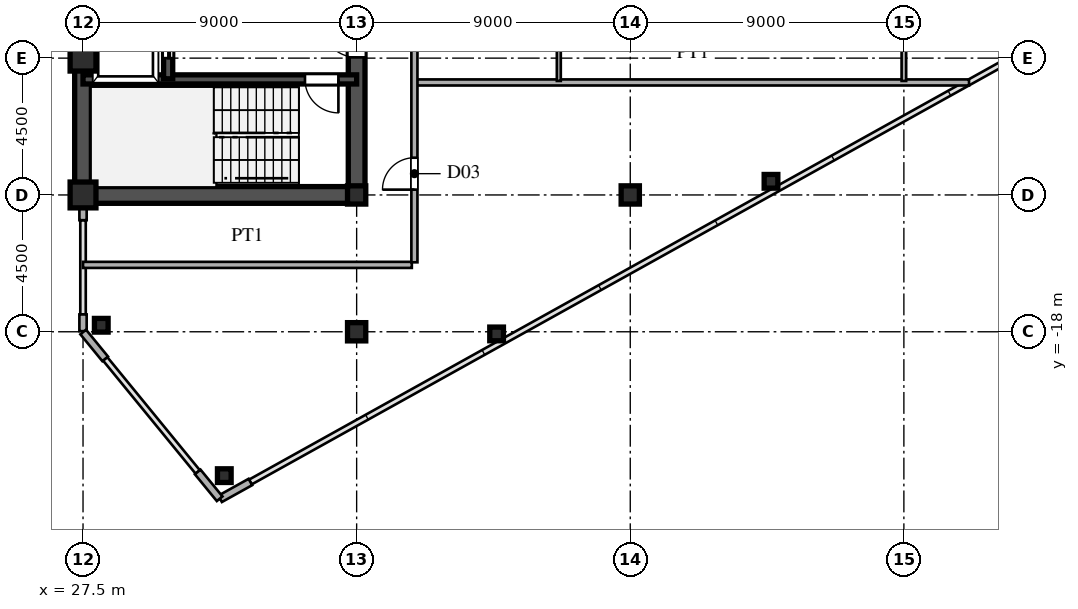
"""IFC4 building model, lengths in metres.
Left out: names, types, materials, properties, quantities, classifications, styles, units other than length and angle.
Written with IfcOpenShell. Run it as: python <this file> out.ifc"""

import sys

from ifc_helpers import new_model, si_unit, direction, frame, frame_2d, origin, origin_2d, place, context, subcontext, project, spatial, rectangle, hollow_rectangle, i_section, extrude, source, transform, mapped, element, fill, save


model = new_model("IFC4")
c1 = context("Model", 3, precision=1e-05, world=origin(), true_north=direction((0.0, 1.0)))
c2 = subcontext(c1, "Body", "Model", "MODEL_VIEW")
j1 = project(units=[si_unit("LENGTHUNIT", "METRE"), si_unit("PLANEANGLEUNIT", "RADIAN")], contexts=[c1])
p1 = place(None, origin())
s1 = spatial("IfcSite", under=j1, at=p1, CompositionType="ELEMENT")
p2 = place(p1, origin())
s2 = spatial("IfcBuilding", under=s1, at=p2, CompositionType="ELEMENT")
p3 = place(p2, frame((0.0, 0.0, 185.1)))
s3 = spatial("IfcBuildingStorey", under=s2, at=p3, CompositionType="ELEMENT", Elevation=185.1)
m1 = source(origin(), c2, "Body", "SweptSolid", [
    extrude(hollow_rectangle(XDim=0.85, YDim=0.85, WallThickness=0.036, at=origin_2d()), origin(), (0.0, 0.0, 1.0), 3.6),
])
for number, where, z_axis, x_axis in (
    (1, (27.5, -13.5, 0.0), (0.0, 0.0, 1.0), (1.0, 0.0, 0.0)),
    (2, (27.5, -9.0, 0.0), (0.0, 0.0, 1.0), (1.0, 0.0, 0.0)),
):
    element("IfcColumn", number, at=place(p3, frame(where, z_axis=z_axis, x_axis=x_axis)), inside=s3, PredefinedType="COLUMN", context=c2, shape_type="MappedRepresentation", body=[
        mapped(m1, transform((0.0, 0.0, 0.0), scale=1.0)),
    ])
m2 = source(origin(), c2, "Body", "SweptSolid", [
    extrude(i_section(OverallWidth=0.6, OverallDepth=0.6, WebThickness=0.025, FlangeThickness=0.04, at=origin_2d()), origin(), (0.0, 0.0, 1.0), 3.6),
])
for number, where, z_axis, x_axis in (
    (3, (36.5, -18.0, 0.0), (0.0, 0.0, 1.0), (1.0, 0.0, 0.0)),
    (4, (36.5, -13.5, 0.0), (0.0, 0.0, 1.0), (1.0, 0.0, 0.0)),
    (5, (45.5, -13.5, 0.0), (0.0, 0.0, 1.0), (1.0, 0.0, 0.0)),
):
    element("IfcColumn", number, at=place(p3, frame(where, z_axis=z_axis, x_axis=x_axis)), inside=s3, PredefinedType="COLUMN", context=c2, shape_type="MappedRepresentation", body=[
        mapped(m2, transform((0.0, 0.0, 0.0), scale=1.0)),
    ])
m3 = source(origin(), c2, "Body", "SweptSolid", [
    extrude(hollow_rectangle(XDim=0.45, YDim=0.45, WallThickness=0.018, at=origin_2d()), origin(), (0.0, 0.0, 1.0), 3.6),
])
for number, where, z_axis, x_axis in (
    (6, (32.147, -22.732, 0.0), (0.0, 0.0, 1.0), (1.0, 0.0, 0.0)),
    (7, (28.1, -17.786, 0.0), (0.0, 0.0, 1.0), (1.0, 0.0, 0.0)),
    (8, (41.104, -18.071, 0.0), (0.0, 0.0, 1.0), (1.0, 0.0, 0.0)),
    (9, (50.129, -13.051, 0.0), (0.0, 0.0, 1.0), (1.0, 0.0, 0.0)),
):
    element("IfcColumn", number, at=place(p3, frame(where, z_axis=z_axis, x_axis=x_axis)), inside=s3, PredefinedType="COLUMN", context=c2, shape_type="MappedRepresentation", body=[
        mapped(m3, transform((0.0, 0.0, 0.0), scale=1.0)),
    ])
p4 = place(p3, frame((32.009, -23.495, 0.0), z_axis=(0.0, 0.0, 1.0), x_axis=(0.87385402111, 0.486188389196, 0.0)))
e10 = element("IfcWall", 10, at=p4, inside=s3, PredefinedType="SOLIDWALL", context=c2, shape_type="SweptSolid", body=[
    extrude(rectangle(XDim=1.14, YDim=0.24, at=frame_2d((0.57, 0.0))), origin(), (0.0, 0.0, 1.0), 3.38),
])
p5 = place(p3, frame((27.5, -17.98, 0.0), z_axis=(0.0, 0.0, 1.0), x_axis=(0.0, 1.0, 0.0)))
e11 = element("IfcWall", 11, at=p5, inside=s3, PredefinedType="SOLIDWALL", context=c2, shape_type="SweptSolid", body=[
    extrude(rectangle(XDim=0.55, YDim=0.24, at=frame_2d((0.275, 0.0))), origin(), (0.0, 0.0, 1.0), 3.38),
])
p6 = place(p3, frame((27.5, -14.33, 0.0), z_axis=(0.0, 0.0, 1.0), x_axis=(0.0, 1.0, 0.0)))
e12 = element("IfcWall", 12, at=p6, inside=s3, PredefinedType="SOLIDWALL", context=c2, shape_type="SweptSolid", body=[
    extrude(rectangle(XDim=0.55, YDim=0.24, at=frame_2d((0.275, 0.0))), origin(), (0.0, 0.0, 1.0), 2.88),
])
for number, where, z_axis, x_axis in (
    (13, (27.506, -18.008, 0.0), (0.0, 0.0, 1.0), (0.633, -0.774, 0.0)),
    (14, (31.272, -22.61, 0.0), (0.0, 0.0, 1.0), (0.633, -0.774, 0.0)),
):
    element("IfcWall", number, at=place(p3, frame(where, z_axis=z_axis, x_axis=x_axis)), inside=s3, PredefinedType="SOLIDWALL", context=c2, shape_type="SweptSolid", body=[
        extrude(rectangle(XDim=1.14, YDim=0.24, at=frame_2d((0.57, 0.0))), origin(), (0.0, 0.0, 1.0), 3.38),
    ])
p7 = place(p3, frame((27.5, -13.5, 0.0), z_axis=(0.0, 0.0, 1.0), x_axis=(0.0, 1.0, 0.0)))
e15 = element("IfcWall", 15, at=p7, inside=s3, PredefinedType="SHEAR", context=c2, shape_type="SweptSolid", body=[
    extrude(rectangle(XDim=12.2, YDim=0.55, at=frame_2d((6.1, 0.0))), origin(), (0.0, 0.0, 1.0), 3.38),
])
p8 = place(p3, frame((27.5, -13.5, 0.0), z_axis=(0.0, 0.0, 1.0), x_axis=(1.0, 0.0, 0.0)))
e16 = element("IfcWall", 16, at=p8, inside=s3, PredefinedType="SHEAR", context=c2, shape_type="SweptSolid", body=[
    extrude(rectangle(XDim=9.0, YDim=0.55, at=frame_2d((4.5, 0.0))), origin(), (0.0, 0.0, 1.0), 3.38),
])
p9 = place(p3, frame((36.5, -13.65, 0.0), z_axis=(0.0, 0.0, 1.0), x_axis=(0.0, 1.0, 0.0)))
e17 = element("IfcWall", 17, at=p9, inside=s3, PredefinedType="SHEAR", context=c2, shape_type="SweptSolid", body=[
    extrude(rectangle(XDim=7.15, YDim=0.55, at=frame_2d((3.575, 0.0))), origin(), (0.0, 0.0, 1.0), 3.38),
])
p10 = place(p9, frame((4.675, 0.0, 0.0)))
e18 = element("IfcOpeningElement", 18, at=p10, cuts=e17, PredefinedType="OPENING", context=c2, shape_type="SweptSolid", body=[
    extrude(rectangle(XDim=1.15, YDim=2.2, at=frame_2d((0.575, 1.1))), frame((0.0, 0.285, 0.0), z_axis=(0.0, -1.0, 0.0), x_axis=(1.0, 0.0, 0.0)), (0.0, 0.0, 1.0), 0.57),
])
p11 = place(p3, frame((27.5, -9.7, 0.0), z_axis=(0.0, 0.0, 1.0), x_axis=(1.0, 0.0, 0.0)))
e19 = element("IfcWall", 19, at=p11, inside=s3, PredefinedType="SHEAR", context=c2, shape_type="SweptSolid", body=[
    extrude(rectangle(XDim=9.0, YDim=0.3, at=frame_2d((4.5, 0.0))), origin(), (0.0, 0.0, 1.0), 3.38),
])
p12 = place(p11, frame((7.3, 0.0, 0.0)))
e20 = element("IfcOpeningElement", 20, at=p12, cuts=e19, PredefinedType="OPENING", context=c2, shape_type="SweptSolid", body=[
    extrude(rectangle(XDim=1.1, YDim=2.2, at=frame_2d((0.55, 1.1))), frame((0.0, 0.16, 0.0), z_axis=(0.0, -1.0, 0.0), x_axis=(1.0, 0.0, 0.0)), (0.0, 0.0, 1.0), 0.32),
])
p13 = place(p3, frame((30.3, -9.68, 0.0), z_axis=(0.0, 0.0, 1.0), x_axis=(0.0, 1.0, 0.0)))
e21 = element("IfcWall", 21, at=p13, inside=s3, PredefinedType="SHEAR", context=c2, shape_type="SweptSolid", body=[
    extrude(rectangle(XDim=2.56, YDim=0.3, at=frame_2d((1.28, 0.0))), origin(), (0.0, 0.0, 1.0), 3.38),
])
p14 = place(p13, frame((0.68, 0.0, 0.0)))
e22 = element("IfcOpeningElement", 22, at=p14, cuts=e21, PredefinedType="OPENING", context=c2, shape_type="SweptSolid", body=[
    extrude(rectangle(XDim=1.2, YDim=2.25, at=frame_2d((0.6, 1.125))), frame((0.0, 0.16, 0.0), z_axis=(0.0, -1.0, 0.0), x_axis=(1.0, 0.0, 0.0)), (0.0, 0.0, 1.0), 0.32),
])
p15 = place(p3, frame((27.5, -15.8, 0.0), z_axis=(0.0, 0.0, 1.0), x_axis=(1.0, 0.0, 0.0)))
e23 = element("IfcWall", 23, at=p15, inside=s3, PredefinedType="PARTITIONING", context=c2, shape_type="SweptSolid", body=[
    extrude(rectangle(XDim=10.815, YDim=0.2, at=frame_2d((5.407, 0.0))), origin(), (0.0, 0.0, 1.0), 3.38),
])
p16 = place(p3, frame((38.48, -9.8, 0.0), z_axis=(0.0, 0.0, 1.0), x_axis=(1.0, 0.0, 0.0)))
e24 = element("IfcWall", 24, at=p16, inside=s3, PredefinedType="PARTITIONING", context=c2, shape_type="SweptSolid", body=[
    extrude(rectangle(XDim=18.163, YDim=0.2, at=frame_2d((9.082, 0.0))), origin(), (0.0, 0.0, 1.0), 3.38),
])
p17 = place(p3, frame((38.4, -15.715, 0.0), z_axis=(0.0, 0.0, 1.0), x_axis=(0.0, 1.0, 0.0)))
e25 = element("IfcWall", 25, at=p17, inside=s3, PredefinedType="PARTITIONING", context=c2, shape_type="SweptSolid", body=[
    extrude(rectangle(XDim=31.43, YDim=0.2, at=frame_2d((15.715, 0.0))), origin(), (0.0, 0.0, 1.0), 3.38),
])
p18 = place(p17, frame((2.39, 0.0, 0.0)))
e26 = element("IfcOpeningElement", 26, at=p18, cuts=e25, PredefinedType="OPENING", context=c2, shape_type="SweptSolid", body=[
    extrude(rectangle(XDim=1.05, YDim=2.25, at=frame_2d((0.525, 1.125))), frame((0.0, 0.11, 0.0), z_axis=(0.0, -1.0, 0.0), x_axis=(1.0, 0.0, 0.0)), (0.0, 0.0, 1.0), 0.22),
])
p19 = place(p17, frame((11.695, 0.0, 0.0)))
e27 = element("IfcOpeningElement", 27, at=p19, cuts=e25, PredefinedType="OPENING", context=c2, shape_type="SweptSolid", body=[
    extrude(rectangle(XDim=1.05, YDim=2.25, at=frame_2d((0.525, 1.125))), frame((0.0, 0.11, 0.0), z_axis=(0.0, -1.0, 0.0), x_axis=(1.0, 0.0, 0.0)), (0.0, 0.0, 1.0), 0.22),
])
p20 = place(p17, frame((24.69, 0.0, 0.0)))
e28 = element("IfcOpeningElement", 28, at=p20, cuts=e25, PredefinedType="OPENING", context=c2, shape_type="SweptSolid", body=[
    extrude(rectangle(XDim=1.05, YDim=2.25, at=frame_2d((0.525, 1.125))), frame((0.0, 0.11, 0.0), z_axis=(0.0, -1.0, 0.0), x_axis=(1.0, 0.0, 0.0)), (0.0, 0.0, 1.0), 0.22),
])
p21 = place(p3, frame((43.15, -9.75, 0.0), z_axis=(0.0, 0.0, 1.0), x_axis=(0.0, 1.0, 0.0)))
e29 = element("IfcWall", 29, at=p21, inside=s3, PredefinedType="PARTITIONING", context=c2, shape_type="SweptSolid", body=[
    extrude(rectangle(XDim=3.408, YDim=0.13, at=frame_2d((1.704, 0.0))), origin(), (0.0, 0.0, 1.0), 3.38),
])
p22 = place(p3, frame((54.5, -9.75, 0.0), z_axis=(0.0, 0.0, 1.0), x_axis=(0.0, 1.0, 0.0)))
e30 = element("IfcWall", 30, at=p22, inside=s3, PredefinedType="PARTITIONING", context=c2, shape_type="SweptSolid", body=[
    extrude(rectangle(XDim=12.9, YDim=0.15, at=frame_2d((6.45, 0.0))), origin(), (0.0, 0.0, 1.0), 2.78),
])
p23 = place(p22, frame((5.975, 0.0, 0.0)))
e31 = element("IfcOpeningElement", 31, at=p23, cuts=e30, PredefinedType="OPENING", context=c2, shape_type="SweptSolid", body=[
    extrude(rectangle(XDim=0.95, YDim=2.15, at=frame_2d((0.475, 1.075))), frame((0.0, 0.085, 0.0), z_axis=(0.0, -1.0, 0.0), x_axis=(1.0, 0.0, 0.0)), (0.0, 0.0, 1.0), 0.17),
])
m4 = source(origin(), c2, "Body", "SweptSolid", [
    extrude(rectangle(XDim=1.15, YDim=2.2, at=frame_2d((0.575, 1.1))), frame((0.0, 0.025, 0.0), z_axis=(0.0, -1.0, 0.0), x_axis=(1.0, 0.0, 0.0)), (0.0, 0.0, 1.0), 0.05),
])
p24 = place(p10, origin())
e32 = element("IfcDoor", 32, at=p24, inside=s3, OperationType="SINGLE_SWING_RIGHT", PredefinedType="DOOR", context=c2, shape_type="MappedRepresentation", body=[
    mapped(m4, transform((0.0, 0.0, 0.0), scale=1.0)),
])
fill(e18, e32)
m5 = source(origin(), c2, "Body", "SweptSolid", [
    extrude(rectangle(XDim=1.1, YDim=2.2, at=frame_2d((0.55, 1.1))), frame((0.0, 0.025, 0.0), z_axis=(0.0, -1.0, 0.0), x_axis=(1.0, 0.0, 0.0)), (0.0, 0.0, 1.0), 0.05),
])
p25 = place(p12, frame((1.1, 0.0, 0.0), z_axis=(0.0, 0.0, 1.0), x_axis=(-1.0, 0.0, 0.0)))
e33 = element("IfcDoor", 33, at=p25, inside=s3, OperationType="SINGLE_SWING_RIGHT", PredefinedType="DOOR", context=c2, shape_type="MappedRepresentation", body=[
    mapped(m5, transform((0.0, 0.0, 0.0), scale=1.0)),
])
fill(e20, e33)
m6 = source(origin(), c2, "Body", "SweptSolid", [
    extrude(rectangle(XDim=1.2, YDim=2.25, at=frame_2d((0.6, 1.125))), frame((0.0, 0.025, 0.0), z_axis=(0.0, -1.0, 0.0), x_axis=(1.0, 0.0, 0.0)), (0.0, 0.0, 1.0), 0.05),
])
p26 = place(p14, origin())
e34 = element("IfcDoor", 34, at=p26, inside=s3, OperationType="DOUBLE_DOOR_SLIDING", PredefinedType="DOOR", context=c2, shape_type="MappedRepresentation", body=[
    mapped(m6, transform((0.0, 0.0, 0.0), scale=1.0)),
])
fill(e22, e34)
m7 = source(origin(), c2, "Body", "SweptSolid", [
    extrude(rectangle(XDim=1.05, YDim=2.25, at=frame_2d((0.525, 1.125))), frame((0.0, 0.025, 0.0), z_axis=(0.0, -1.0, 0.0), x_axis=(1.0, 0.0, 0.0)), (0.0, 0.0, 1.0), 0.05),
])
p27 = place(p18, origin())
e35 = element("IfcDoor", 35, at=p27, inside=s3, OperationType="SINGLE_SWING_LEFT", PredefinedType="DOOR", context=c2, shape_type="MappedRepresentation", body=[
    mapped(m7, transform((0.0, 0.0, 0.0), scale=1.0)),
])
fill(e26, e35)
save(model, sys.argv[1])
